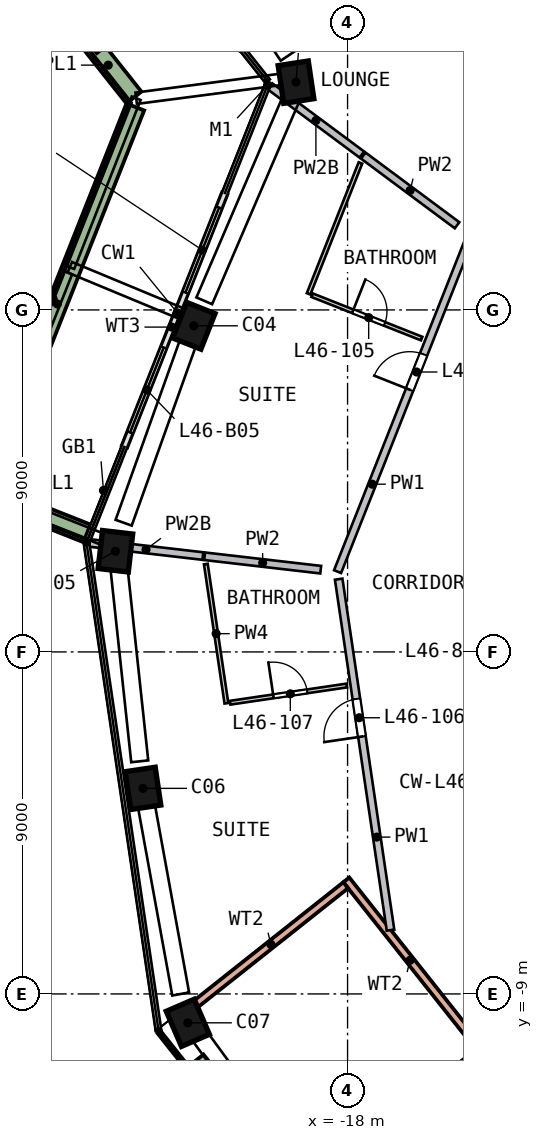
"""IFC4 building model, lengths in metres.
Left out: names, types, materials, properties, quantities, classifications, styles, units other than length and angle.
Written with IfcOpenShell. Run it as: python <this file> out.ifc"""

import sys

from ifc_helpers import new_model, si_unit, direction, frame, frame_2d, origin, origin_2d, place, context, subcontext, project, spatial, rectangle, extrude, element, fill, save


model = new_model("IFC4")
c1 = context("Model", 3, precision=1e-05, world=origin(), true_north=direction((0.0, 1.0)))
c2 = subcontext(c1, "Body", "Model", "MODEL_VIEW")
j1 = project(units=[si_unit("LENGTHUNIT", "METRE"), si_unit("PLANEANGLEUNIT", "RADIAN")], contexts=[c1])
p1 = place(None, origin())
s1 = spatial("IfcSite", under=j1, at=p1, CompositionType="ELEMENT")
p2 = place(p1, origin())
s2 = spatial("IfcBuilding", under=s1, at=p2, CompositionType="ELEMENT")
p3 = place(p2, frame((0.0, 0.0, 190.5)))
s3 = spatial("IfcBuildingStorey", under=s2, at=p3, CompositionType="ELEMENT", Elevation=190.5)
p4 = place(p3, frame((-19.271, 15.105, 0.0), z_axis=(-0.071073188, -0.092205109, 0.993200292), x_axis=(-0.152064575, 0.985081162, 0.080569652)))
e1 = element("IfcColumn", 1, at=p4, inside=s3, PredefinedType="COLUMN", context=c2, shape_type="SweptSolid", body=[
    extrude(rectangle(XDim=1.0, YDim=0.8, at=origin_2d()), origin(), (0.0, 0.0, 1.0), 3.212),
])
p5 = place(p3, frame((-21.997, 8.709, 0.0), z_axis=(-0.04053392, -0.104947109, 0.9936514), x_axis=(-0.365857575, -0.923846438, -0.112498865)))
e2 = element("IfcColumn", 2, at=p5, inside=s3, PredefinedType="COLUMN", context=c2, shape_type="SweptSolid", body=[
    extrude(rectangle(XDim=1.0, YDim=0.8, at=origin_2d()), origin(), (0.0, 0.0, 1.0), 3.21),
])
p6 = place(p3, frame((-24.094, 2.788, 0.0), z_axis=(-0.012315789, -0.114719294, 0.993321602), x_axis=(0.114411018, 0.986711138, 0.115374383)))
e3 = element("IfcColumn", 3, at=p6, inside=s3, PredefinedType="COLUMN", context=c2, shape_type="SweptSolid", body=[
    extrude(rectangle(XDim=1.0, YDim=0.8, at=origin_2d()), origin(), (0.0, 0.0, 1.0), 3.211),
])
p7 = place(p3, frame((-23.405, -3.456, 0.0), z_axis=(0.017339041, -0.111182795, 0.993648702), x_axis=(0.144773256, -0.983045954, -0.112522692)))
e4 = element("IfcColumn", 4, at=p7, inside=s3, PredefinedType="COLUMN", context=c2, shape_type="SweptSolid", body=[
    extrude(rectangle(XDim=1.0, YDim=0.8, at=origin_2d()), origin(), (0.0, 0.0, 1.0), 3.21),
])
p8 = place(p3, frame((-22.26, -9.633, 0.0), z_axis=(0.046678706, -0.105445221, 0.99332895), x_axis=(-0.394366098, 0.911690041, 0.115311103)))
e5 = element("IfcColumn", 5, at=p8, inside=s3, PredefinedType="COLUMN", context=c2, shape_type="SweptSolid", body=[
    extrude(rectangle(XDim=1.0, YDim=0.8, at=origin_2d()), origin(), (0.0, 0.0, 1.0), 3.211),
])
p9 = place(p3, frame((-21.233, 12.064, 0.0), z_axis=(0.0, 0.0, 1.0), x_axis=(-0.368157089, -0.929763603, 0.0)))
e6 = element("IfcWall", 6, at=p9, inside=s3, PredefinedType="SOLIDWALL", context=c2, shape_type="SweptSolid", body=[
    extrude(rectangle(XDim=3.4, YDim=0.15, at=frame_2d((1.7, 0.0))), origin(), (0.0, 0.0, 1.0), 2.475),
])
p10 = place(p9, frame((0.4, 0.0, 0.0)))
e7 = element("IfcOpeningElement", 7, at=p10, cuts=e6, PredefinedType="OPENING", context=c2, shape_type="SweptSolid", body=[
    extrude(rectangle(XDim=2.4, YDim=2.4, at=frame_2d((1.2, 1.2))), frame((0.0, 0.085, 0.0), z_axis=(0.0, -1.0, 0.0), x_axis=(1.0, 0.0, 0.0)), (0.0, 0.0, 1.0), 0.17),
])
p11 = place(p3, frame((-22.485, 8.903, 0.0), z_axis=(0.0, 0.0, 1.0), x_axis=(-0.36808703, -0.929791341, 0.0)))
e8 = element("IfcWall", 8, at=p11, inside=s3, PredefinedType="SOLIDWALL", context=c2, shape_type="SweptSolid", body=[
    extrude(rectangle(XDim=3.761, YDim=0.15, at=frame_2d((1.881, 0.0))), origin(), (0.0, 0.0, 1.0), 2.475),
])
p12 = place(p11, frame((0.961, 0.0, 0.0)))
e9 = element("IfcOpeningElement", 9, at=p12, cuts=e8, PredefinedType="OPENING", context=c2, shape_type="SweptSolid", body=[
    extrude(rectangle(XDim=2.4, YDim=2.4, at=frame_2d((1.2, 1.2))), frame((0.0, 0.085, 0.0), z_axis=(0.0, -1.0, 0.0), x_axis=(1.0, 0.0, 0.0)), (0.0, 0.0, 1.0), 0.17),
])
p13 = place(p3, frame((-24.974, 16.295, 0.0), z_axis=(0.0, 0.0, 1.0), x_axis=(0.621159632, -0.783684064, 0.0)))
e10 = element("IfcWall", 10, at=p13, inside=s3, PredefinedType="SOLIDWALL", context=c2, shape_type="SweptSolid", body=[
    extrude(rectangle(XDim=2.177, YDim=0.5, at=frame_2d((1.088, 0.0))), origin(), (0.0, 0.0, 1.0), 0.7),
])
p14 = place(p3, frame((-23.585, 14.342, 0.0), z_axis=(0.0, 0.0, 1.0), x_axis=(-0.368119816, -0.929778361, 0.0)))
e11 = element("IfcWall", 11, at=p14, inside=s3, PredefinedType="SOLIDWALL", context=c2, shape_type="SweptSolid", body=[
    extrude(rectangle(XDim=11.153, YDim=0.5, at=frame_2d((5.576, 0.0))), origin(), (0.0, 0.0, 1.0), 0.7),
])
p15 = place(p3, frame((-27.366, 4.113, 0.0), z_axis=(0.0, 0.0, 1.0), x_axis=(0.92976856, -0.36814457, 0.0)))
e12 = element("IfcWall", 12, at=p15, inside=s3, PredefinedType="SOLIDWALL", context=c2, shape_type="SweptSolid", body=[
    extrude(rectangle(XDim=2.699, YDim=0.5, at=frame_2d((1.35, 0.0))), origin(), (0.0, 0.0, 1.0), 0.7),
])
p16 = place(p3, frame((-9.958, -16.187, 0.0), z_axis=(0.0, 0.0, 1.0), x_axis=(-0.621141056, 0.783698787, 0.0)))
e13 = element("IfcWall", 13, at=p16, inside=s3, PredefinedType="SOLIDWALL", context=c2, shape_type="SweptSolid", body=[
    extrude(rectangle(XDim=13.0, YDim=0.2, at=frame_2d((6.5, 0.0))), origin(), (0.0, 0.0, 1.0), 3.19),
])
p17 = place(p16, frame((5.6, 0.0, 0.0)))
e14 = element("IfcOpeningElement", 14, at=p17, cuts=e13, PredefinedType="OPENING", context=c2, shape_type="SweptSolid", body=[
    extrude(rectangle(XDim=1.8, YDim=2.4, at=frame_2d((0.9, 1.2))), frame((0.0, 0.11, 0.0), z_axis=(0.0, -1.0, 0.0), x_axis=(1.0, 0.0, 0.0)), (0.0, 0.0, 1.0), 0.22),
])
p18 = place(p3, frame((-21.984, -9.258, 0.0), z_axis=(0.0, 0.0, 1.0), x_axis=(0.783697642, 0.6211425, 0.0)))
e15 = element("IfcWall", 15, at=p18, inside=s3, PredefinedType="SOLIDWALL", context=c2, shape_type="SweptSolid", body=[
    extrude(rectangle(XDim=5.021, YDim=0.2, at=frame_2d((2.51, 0.0))), origin(), (0.0, 0.0, 1.0), 3.19),
])
p19 = place(p3, frame((-22.96, -10.006, 0.0), z_axis=(0.0, 0.0, 1.0), x_axis=(0.621145542, -0.783695231, 0.0)))
e16 = element("IfcWall", 16, at=p19, inside=s3, PredefinedType="SOLIDWALL", context=c2, shape_type="SweptSolid", body=[
    extrude(rectangle(XDim=12.84, YDim=0.1, at=frame_2d((6.42, 0.0))), origin(), (0.0, 0.0, 1.0), 0.7),
])
p20 = place(p3, frame((-21.987, -10.75, 0.0), z_axis=(0.0, 0.0, 1.0), x_axis=(0.621186078, -0.783663102, 0.0)))
e17 = element("IfcWall", 17, at=p20, inside=s3, PredefinedType="SOLIDWALL", context=c2, shape_type="SweptSolid", body=[
    extrude(rectangle(XDim=4.633, YDim=0.5, at=frame_2d((2.316, 0.0))), origin(), (0.0, 0.0, 1.0), 0.7),
])
p21 = place(p3, frame((-16.87, -7.321, 0.0), z_axis=(0.0, 0.0, 1.0), x_axis=(-0.146065336, 0.989274945, 0.0)))
e18 = element("IfcWall", 18, at=p21, inside=s3, PredefinedType="SOLIDWALL", context=c2, shape_type="SweptSolid", body=[
    extrude(rectangle(XDim=9.337, YDim=0.2, at=frame_2d((4.668, 0.0))), origin(), (0.0, 0.0, 1.0), 3.19),
])
p22 = place(p21, frame((5.15, 0.0, 0.0)))
e19 = element("IfcOpeningElement", 19, at=p22, cuts=e18, PredefinedType="OPENING", context=c2, shape_type="SweptSolid", body=[
    extrude(rectangle(XDim=1.0, YDim=2.1, at=frame_2d((0.5, 1.05))), frame((0.0, 0.11, 0.0), z_axis=(0.0, -1.0, 0.0), x_axis=(1.0, 0.0, 0.0)), (0.0, 0.0, 1.0), 0.22),
])
p23 = place(p3, frame((-18.263, 2.113, 0.0), z_axis=(0.0, 0.0, 1.0), x_axis=(0.368126327, 0.929775783, 0.0)))
e20 = element("IfcWall", 20, at=p23, inside=s3, PredefinedType="SOLIDWALL", context=c2, shape_type="SweptSolid", body=[
    extrude(rectangle(XDim=9.317, YDim=0.2, at=frame_2d((4.658, 0.0))), origin(), (0.0, 0.0, 1.0), 3.19),
])
p24 = place(p23, frame((5.15, 0.0, 0.0)))
e21 = element("IfcOpeningElement", 21, at=p24, cuts=e20, PredefinedType="OPENING", context=c2, shape_type="SweptSolid", body=[
    extrude(rectangle(XDim=1.0, YDim=2.1, at=frame_2d((0.5, 1.05))), frame((0.0, 0.11, 0.0), z_axis=(0.0, -1.0, 0.0), x_axis=(1.0, 0.0, 0.0)), (0.0, 0.0, 1.0), 0.22),
])
p25 = place(p3, frame((-21.807, 2.523, 0.0), z_axis=(0.0, 0.0, 1.0), x_axis=(-0.993370178, 0.114959513, 0.0)))
e22 = element("IfcWall", 22, at=p25, inside=s3, PredefinedType="SOLIDWALL", context=c2, shape_type="SweptSolid", body=[
    extrude(rectangle(XDim=3.011, YDim=0.2, at=frame_2d((1.506, 0.0))), origin(), (0.0, 0.0, 1.0), 2.69),
])
p26 = place(p3, frame((-18.707, 2.165, 0.0), z_axis=(0.0, 0.0, 1.0), x_axis=(-0.993376903, 0.114901389, 0.0)))
e23 = element("IfcWall", 23, at=p26, inside=s3, PredefinedType="SOLIDWALL", context=c2, shape_type="SweptSolid", body=[
    extrude(rectangle(XDim=3.074, YDim=0.2, at=frame_2d((1.537, 0.0))), origin(), (0.0, 0.0, 1.0), 3.19),
])
p27 = place(p3, frame((-17.624, 13.089, 0.0), z_axis=(0.0, 0.0, 1.0), x_axis=(-0.802773785, 0.596283699, 0.0)))
e24 = element("IfcWall", 24, at=p27, inside=s3, PredefinedType="SOLIDWALL", context=c2, shape_type="SweptSolid", body=[
    extrude(rectangle(XDim=3.011, YDim=0.2, at=frame_2d((1.506, 0.0))), origin(), (0.0, 0.0, 1.0), 2.69),
])
p28 = place(p3, frame((-12.411, 13.078, 0.0), z_axis=(0.0, 0.0, 1.0), x_axis=(-0.62114487, 0.783695764, 0.0)))
e25 = element("IfcWall", 25, at=p28, inside=s3, PredefinedType="SOLIDWALL", context=c2, shape_type="SweptSolid", body=[
    extrude(rectangle(XDim=14.274, YDim=0.2, at=frame_2d((7.137, 0.0))), origin(), (0.0, 0.0, 1.0), 3.19),
])
p29 = place(p28, frame((4.4, 0.0, 0.0)))
e26 = element("IfcOpeningElement", 26, at=p29, cuts=e25, PredefinedType="OPENING", context=c2, shape_type="SweptSolid", body=[
    extrude(rectangle(XDim=1.0, YDim=2.1, at=frame_2d((0.5, 1.05))), frame((0.0, 0.11, 0.0), z_axis=(0.0, -1.0, 0.0), x_axis=(1.0, 0.0, 0.0)), (0.0, 0.0, 1.0), 0.22),
])
p30 = place(p3, frame((-15.119, 11.228, 0.0), z_axis=(0.0, 0.0, 1.0), x_axis=(-0.802820945, 0.596220203, 0.0)))
e27 = element("IfcWall", 27, at=p30, inside=s3, PredefinedType="SOLIDWALL", context=c2, shape_type="SweptSolid", body=[
    extrude(rectangle(XDim=3.075, YDim=0.2, at=frame_2d((1.537, 0.0))), origin(), (0.0, 0.0, 1.0), 3.19),
])
p31 = place(p3, frame((-18.681, 26.323, 0.0), z_axis=(0.0, 0.0, 1.0), x_axis=(0.621153195, -0.783689165, 0.0)))
e28 = element("IfcWall", 28, at=p31, inside=s3, PredefinedType="SOLIDWALL", context=c2, shape_type="SweptSolid", body=[
    extrude(rectangle(XDim=14.274, YDim=0.2, at=frame_2d((7.137, 0.0))), origin(), (0.0, 0.0, 1.0), 3.19),
])
p32 = place(p31, frame((4.45, 0.0, 0.0)))
e29 = element("IfcOpeningElement", 29, at=p32, cuts=e28, PredefinedType="OPENING", context=c2, shape_type="SweptSolid", body=[
    extrude(rectangle(XDim=1.0, YDim=2.1, at=frame_2d((0.5, 1.05))), frame((0.0, 0.11, 0.0), z_axis=(0.0, -1.0, 0.0), x_axis=(1.0, 0.0, 0.0)), (0.0, 0.0, 1.0), 0.22),
])
p33 = place(p3, frame((-21.188, -1.351, 0.0), z_axis=(0.0, 0.0, 1.0), x_axis=(-0.14607086, 0.98927413, 0.0)))
e30 = element("IfcWall", 30, at=p33, inside=s3, PredefinedType="PARTITIONING", context=c2, shape_type="SweptSolid", body=[
    extrude(rectangle(XDim=3.704, YDim=0.1, at=frame_2d((1.852, 0.0))), origin(), (0.0, 0.0, 1.0), 3.19),
])
p34 = place(p3, frame((-21.089, -1.337, 0.0), z_axis=(0.0, 0.0, 1.0), x_axis=(0.98926089, 0.146160501, 0.0)))
e31 = element("IfcWall", 31, at=p34, inside=s3, PredefinedType="PARTITIONING", context=c2, shape_type="SweptSolid", body=[
    extrude(rectangle(XDim=3.1, YDim=0.1, at=frame_2d((1.55, 0.0))), origin(), (0.0, 0.0, 1.0), 3.19),
])
p35 = place(p34, frame((1.15, 0.0, 0.0)))
e32 = element("IfcOpeningElement", 32, at=p35, cuts=e31, PredefinedType="OPENING", context=c2, shape_type="SweptSolid", body=[
    extrude(rectangle(XDim=0.9, YDim=2.1, at=frame_2d((0.45, 1.05))), frame((0.0, 0.06, 0.0), z_axis=(0.0, -1.0, 0.0), x_axis=(1.0, 0.0, 0.0)), (0.0, 0.0, 1.0), 0.12),
])
p36 = place(p3, frame((-19.025, 9.424, 0.0), z_axis=(0.0, 0.0, 1.0), x_axis=(0.368126804, 0.929775595, 0.0)))
e33 = element("IfcWall", 33, at=p36, inside=s3, PredefinedType="PARTITIONING", context=c2, shape_type="SweptSolid", body=[
    extrude(rectangle(XDim=3.704, YDim=0.1, at=frame_2d((1.852, 0.0))), origin(), (0.0, 0.0, 1.0), 3.19),
])
p37 = place(p3, frame((-18.932, 9.387, 0.0), z_axis=(0.0, 0.0, 1.0), x_axis=(0.929795945, -0.3680754, 0.0)))
e34 = element("IfcWall", 34, at=p37, inside=s3, PredefinedType="PARTITIONING", context=c2, shape_type="SweptSolid", body=[
    extrude(rectangle(XDim=3.1, YDim=0.1, at=frame_2d((1.55, 0.0))), origin(), (0.0, 0.0, 1.0), 3.19),
])
p38 = place(p37, frame((1.15, 0.0, 0.0)))
e35 = element("IfcOpeningElement", 35, at=p38, cuts=e34, PredefinedType="OPENING", context=c2, shape_type="SweptSolid", body=[
    extrude(rectangle(XDim=0.9, YDim=2.1, at=frame_2d((0.45, 1.05))), frame((0.0, 0.06, 0.0), z_axis=(0.0, -1.0, 0.0), x_axis=(1.0, 0.0, 0.0)), (0.0, 0.0, 1.0), 0.12),
])
p39 = place(p10, origin())
e36 = element("IfcDoor", 36, at=p39, inside=s3, OperationType="SLIDING_TO_RIGHT", PredefinedType="DOOR", context=c2, shape_type="SweptSolid", body=[
    extrude(rectangle(XDim=2.4, YDim=2.4, at=frame_2d((1.2, 1.2))), frame((0.0, 0.025, 0.0), z_axis=(0.0, -1.0, 0.0), x_axis=(1.0, 0.0, 0.0)), (0.0, 0.0, 1.0), 0.05),
])
fill(e7, e36)
p40 = place(p12, origin())
e37 = element("IfcDoor", 37, at=p40, inside=s3, OperationType="SLIDING_TO_LEFT", PredefinedType="DOOR", context=c2, shape_type="SweptSolid", body=[
    extrude(rectangle(XDim=2.4, YDim=2.4, at=frame_2d((1.2, 1.2))), frame((0.0, 0.025, 0.0), z_axis=(0.0, -1.0, 0.0), x_axis=(1.0, 0.0, 0.0)), (0.0, 0.0, 1.0), 0.05),
])
fill(e9, e37)
p41 = place(p24, origin())
e38 = element("IfcDoor", 38, at=p41, inside=s3, OperationType="SINGLE_SWING_LEFT", PredefinedType="DOOR", context=c2, shape_type="SweptSolid", body=[
    extrude(rectangle(XDim=1.0, YDim=2.1, at=frame_2d((0.5, 1.05))), frame((0.0, 0.025, 0.0), z_axis=(0.0, -1.0, 0.0), x_axis=(1.0, 0.0, 0.0)), (0.0, 0.0, 1.0), 0.05),
])
fill(e21, e38)
p42 = place(p38, origin())
e39 = element("IfcDoor", 39, at=p42, inside=s3, OperationType="SINGLE_SWING_LEFT", PredefinedType="DOOR", context=c2, shape_type="SweptSolid", body=[
    extrude(rectangle(XDim=0.9, YDim=2.1, at=frame_2d((0.45, 1.05))), frame((0.0, 0.025, 0.0), z_axis=(0.0, -1.0, 0.0), x_axis=(1.0, 0.0, 0.0)), (0.0, 0.0, 1.0), 0.05),
])
fill(e35, e39)
p43 = place(p22, origin())
e40 = element("IfcDoor", 40, at=p43, inside=s3, OperationType="SINGLE_SWING_LEFT", PredefinedType="DOOR", context=c2, shape_type="SweptSolid", body=[
    extrude(rectangle(XDim=1.0, YDim=2.1, at=frame_2d((0.5, 1.05))), frame((0.0, 0.025, 0.0), z_axis=(0.0, -1.0, 0.0), x_axis=(1.0, 0.0, 0.0)), (0.0, 0.0, 1.0), 0.05),
])
fill(e19, e40)
p44 = place(p35, origin())
e41 = element("IfcDoor", 41, at=p44, inside=s3, OperationType="SINGLE_SWING_LEFT", PredefinedType="DOOR", context=c2, shape_type="SweptSolid", body=[
    extrude(rectangle(XDim=0.9, YDim=2.1, at=frame_2d((0.45, 1.05))), frame((0.0, 0.025, 0.0), z_axis=(0.0, -1.0, 0.0), x_axis=(1.0, 0.0, 0.0)), (0.0, 0.0, 1.0), 0.05),
])
fill(e32, e41)
save(model, sys.argv[1])
